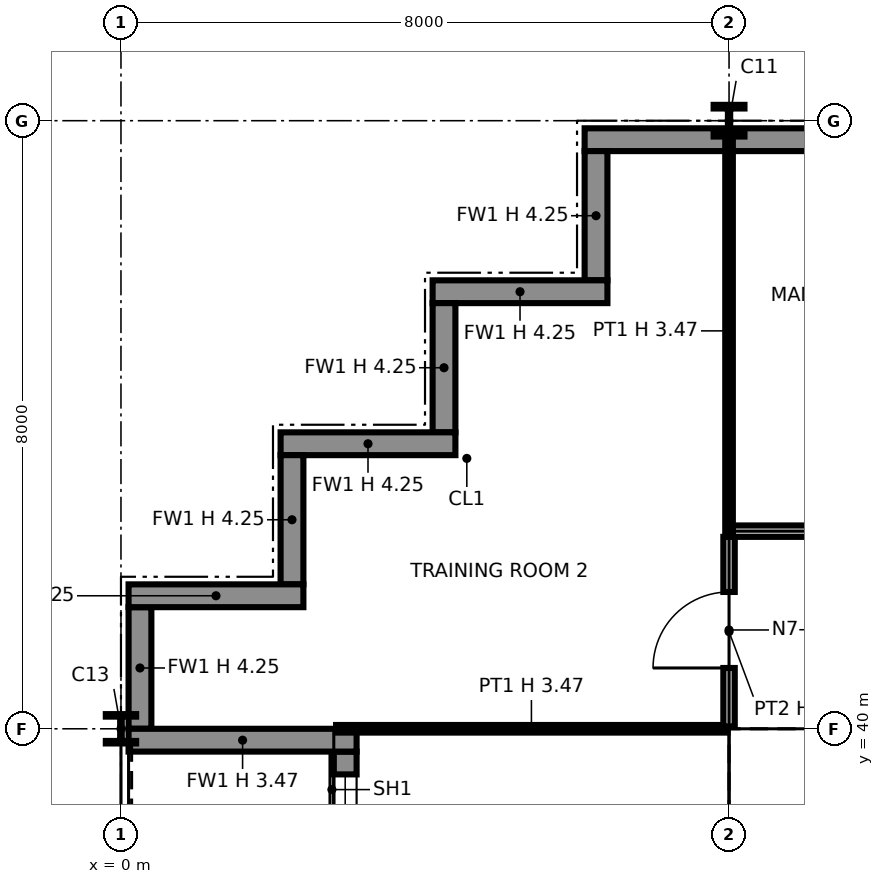
"""IFC4 building model, lengths in metres.
Left out: names, types, materials, properties, quantities, classifications, styles, units other than length and angle.
Written with IfcOpenShell. Run it as: python <this file> out.ifc"""

import sys

from ifc_helpers import new_model, si_unit, direction, frame, frame_2d, origin, origin_2d, place, context, subcontext, project, spatial, polyline, rectangle, i_section, outline, extrude, element, fill, save


model = new_model("IFC4")
c1 = context("Model", 3, precision=1e-05, world=origin(), true_north=direction((0.0, 1.0)))
c2 = subcontext(c1, "Body", "Model", "MODEL_VIEW")
j1 = project(units=[si_unit("LENGTHUNIT", "METRE"), si_unit("PLANEANGLEUNIT", "RADIAN")], contexts=[c1])
p1 = place(None, origin())
s1 = spatial("IfcSite", under=j1, at=p1, CompositionType="ELEMENT")
p2 = place(p1, origin())
s2 = spatial("IfcBuilding", under=s1, at=p2, CompositionType="ELEMENT")
p3 = place(p2, frame((0.0, 0.0, 105.2)))
s3 = spatial("IfcBuildingStorey", under=s2, at=p3, CompositionType="ELEMENT", Elevation=105.2)
p4 = place(p3, frame((0.0, 40.0, 0.0), z_axis=(0.0, 0.0, 1.0), x_axis=(1.0, 0.0, 0.0)))
e1 = element("IfcColumn", 1, at=p4, inside=s3, PredefinedType="COLUMN", context=c2, shape_type="SweptSolid", body=[
    extrude(i_section(OverallWidth=0.399, OverallDepth=0.386, WebThickness=0.021, FlangeThickness=0.033, at=origin_2d()), origin(), (0.0, 0.0, 1.0), 4.25),
])
p5 = place(p3, frame((8.0, 40.0, 0.0), z_axis=(0.0, 0.0, 1.0), x_axis=(1.0, 0.0, 0.0)))
e2 = element("IfcColumn", 2, at=p5, inside=s3, PredefinedType="COLUMN", context=c2, shape_type="SweptSolid", body=[
    extrude(i_section(OverallWidth=0.373, OverallDepth=0.368, WebThickness=0.015, FlangeThickness=0.024, at=origin_2d()), origin(), (0.0, 0.0, 1.0), 4.25),
])
p6 = place(p3, frame((8.0, 48.0, 0.0), z_axis=(0.0, 0.0, 1.0), x_axis=(1.0, 0.0, 0.0)))
e3 = element("IfcColumn", 3, at=p6, inside=s3, PredefinedType="COLUMN", context=c2, shape_type="SweptSolid", body=[
    extrude(i_section(OverallWidth=0.406, OverallDepth=0.417, WebThickness=0.03, FlangeThickness=0.048, at=origin_2d()), origin(), (0.0, 0.0, 1.0), 4.25),
])
p7 = place(p3, frame((0.25, 41.6, 0.0), z_axis=(0.0, 0.0, 1.0), x_axis=(0.0, -1.0, 0.0)))
e4 = element("IfcWall", 4, at=p7, inside=s3, PredefinedType="SOLIDWALL", context=c2, shape_type="SweptSolid", body=[
    extrude(rectangle(XDim=1.6, YDim=0.3, at=frame_2d((0.8, 0.0))), origin(), (0.0, 0.0, 1.0), 4.25),
])
p8 = place(p3, frame((2.95, 39.7, 0.0), z_axis=(0.0, 0.0, 1.0), x_axis=(0.0, -1.0, 0.0)))
e5 = element("IfcWall", 5, at=p8, inside=s3, PredefinedType="SOLIDWALL", context=c2, shape_type="SweptSolid", body=[
    extrude(rectangle(XDim=7.4, YDim=0.3, at=frame_2d((3.7, 0.0))), origin(), (0.0, 0.0, 1.0), 4.25),
])
p9 = place(p8, frame((0.3, 0.0, 0.9)))
e6 = element("IfcOpeningElement", 6, at=p9, cuts=e5, PredefinedType="OPENING", context=c2, shape_type="SweptSolid", body=[
    extrude(rectangle(XDim=2.8, YDim=2.2, at=frame_2d((1.4, 1.1))), frame((0.0, 0.16, 0.0), z_axis=(0.0, -1.0, 0.0), x_axis=(1.0, 0.0, 0.0)), (0.0, 0.0, 1.0), 0.32),
])
p10 = place(p8, frame((4.7, 0.0, 0.0)))
e7 = element("IfcOpeningElement", 7, at=p10, cuts=e5, PredefinedType="OPENING", context=c2, shape_type="SweptSolid", body=[
    extrude(rectangle(XDim=2.0, YDim=2.4, at=frame_2d((1.0, 1.2))), frame((0.0, 0.16, 0.0), z_axis=(0.0, -1.0, 0.0), x_axis=(1.0, 0.0, 0.0)), (0.0, 0.0, 1.0), 0.32),
])
p11 = place(p3, frame((0.1, 39.85, 0.0), z_axis=(0.0, 0.0, 1.0), x_axis=(1.0, 0.0, 0.0)))
e8 = element("IfcWall", 8, at=p11, inside=s3, PredefinedType="SOLIDWALL", context=c2, shape_type="SweptSolid", body=[
    extrude(rectangle(XDim=3.0, YDim=0.3, at=frame_2d((1.5, 0.0))), origin(), (0.0, 0.0, 1.0), 3.469),
])
p12 = place(p3, frame((16.0, 47.75, 0.0), z_axis=(0.0, 0.0, 1.0), x_axis=(-1.0, 0.0, 0.0)))
e9 = element("IfcWall", 9, at=p12, inside=s3, PredefinedType="SOLIDWALL", context=c2, shape_type="SweptSolid", body=[
    extrude(rectangle(XDim=9.9, YDim=0.3, at=frame_2d((4.95, 0.0))), origin(), (0.0, 0.0, 1.0), 4.25),
])
p13 = place(p3, frame((6.25, 47.6, 0.0), z_axis=(0.0, 0.0, 1.0), x_axis=(0.0, -1.0, 0.0)))
e10 = element("IfcWall", 10, at=p13, inside=s3, PredefinedType="SOLIDWALL", context=c2, shape_type="SweptSolid", body=[
    extrude(rectangle(XDim=1.7, YDim=0.3, at=frame_2d((0.85, 0.0))), origin(), (0.0, 0.0, 1.0), 4.25),
])
p14 = place(p3, frame((6.4, 45.75, 0.0), z_axis=(0.0, 0.0, 1.0), x_axis=(-1.0, 0.0, 0.0)))
e11 = element("IfcWall", 11, at=p14, inside=s3, PredefinedType="SOLIDWALL", context=c2, shape_type="SweptSolid", body=[
    extrude(rectangle(XDim=2.3, YDim=0.3, at=frame_2d((1.15, 0.0))), origin(), (0.0, 0.0, 1.0), 4.25),
])
p15 = place(p3, frame((4.25, 45.6, 0.0), z_axis=(0.0, 0.0, 1.0), x_axis=(0.0, -1.0, 0.0)))
e12 = element("IfcWall", 12, at=p15, inside=s3, PredefinedType="SOLIDWALL", context=c2, shape_type="SweptSolid", body=[
    extrude(rectangle(XDim=1.7, YDim=0.3, at=frame_2d((0.85, 0.0))), origin(), (0.0, 0.0, 1.0), 4.25),
])
p16 = place(p3, frame((4.4, 43.75, 0.0), z_axis=(0.0, 0.0, 1.0), x_axis=(-1.0, 0.0, 0.0)))
e13 = element("IfcWall", 13, at=p16, inside=s3, PredefinedType="SOLIDWALL", context=c2, shape_type="SweptSolid", body=[
    extrude(rectangle(XDim=2.3, YDim=0.3, at=frame_2d((1.15, 0.0))), origin(), (0.0, 0.0, 1.0), 4.25),
])
p17 = place(p3, frame((2.25, 43.6, 0.0), z_axis=(0.0, 0.0, 1.0), x_axis=(0.0, -1.0, 0.0)))
e14 = element("IfcWall", 14, at=p17, inside=s3, PredefinedType="SOLIDWALL", context=c2, shape_type="SweptSolid", body=[
    extrude(rectangle(XDim=1.7, YDim=0.3, at=frame_2d((0.85, 0.0))), origin(), (0.0, 0.0, 1.0), 4.25),
])
p18 = place(p3, frame((2.4, 41.75, 0.0), z_axis=(0.0, 0.0, 1.0), x_axis=(-1.0, 0.0, 0.0)))
e15 = element("IfcWall", 15, at=p18, inside=s3, PredefinedType="SOLIDWALL", context=c2, shape_type="SweptSolid", body=[
    extrude(rectangle(XDim=2.3, YDim=0.3, at=frame_2d((1.15, 0.0))), origin(), (0.0, 0.0, 1.0), 4.25),
])
p19 = place(p3, frame((8.75, 32.85, 0.0), z_axis=(0.0, 0.0, 1.0), x_axis=(0.0, 1.0, 0.0)))
e16 = element("IfcWall", 16, at=p19, inside=s3, PredefinedType="PARTITIONING", context=c2, shape_type="SweptSolid", body=[
    extrude(outline(polyline([(0.0, 0.0), (6.3, 0.0), (6.3, 4.25), (3.231, 4.25), (3.23, 3.789), (3.07, 3.789), (3.069, 4.25), (0.0, 4.25), (0.0, 0.0)])), frame((0.0, 0.1, 0.0), z_axis=(0.0, -1.0, 0.0), x_axis=(1.0, 0.0, 0.0)), (0.0, 0.0, 1.0), 0.2),
])
p20 = place(p3, frame((8.65, 39.25, 0.0), z_axis=(0.0, 0.0, 1.0), x_axis=(1.0, 0.0, 0.0)))
e17 = element("IfcWall", 17, at=p20, inside=s3, PredefinedType="PARTITIONING", context=c2, shape_type="SweptSolid", body=[
    extrude(outline(polyline([(0.0, 0.0), (14.7, 0.0), (14.7, 4.25), (7.469, 4.25), (7.469, 3.632), (7.231, 3.632), (7.23, 4.25), (0.0, 4.25), (0.0, 0.0)])), frame((0.0, 0.1, 0.0), z_axis=(0.0, -1.0, 0.0), x_axis=(1.0, 0.0, 0.0)), (0.0, 0.0, 1.0), 0.2),
])
p21 = place(p3, frame((2.83, 40.0, 0.0), z_axis=(0.0, 0.0, 1.0), x_axis=(1.0, 0.0, 0.0)))
e18 = element("IfcWall", 18, at=p21, inside=s3, PredefinedType="PARTITIONING", context=c2, shape_type="SweptSolid", body=[
    extrude(rectangle(XDim=5.14, YDim=0.1, at=frame_2d((2.57, 0.0))), origin(), (0.0, 0.0, 1.0), 3.47),
])
p22 = place(p3, frame((8.0, 40.03, 0.0), z_axis=(0.0, 0.0, 1.0), x_axis=(0.0, 1.0, 0.0)))
e19 = element("IfcWall", 19, at=p22, inside=s3, PredefinedType="PARTITIONING", context=c2, shape_type="SweptSolid", body=[
    extrude(rectangle(XDim=2.495, YDim=0.15, at=frame_2d((1.248, 0.0))), origin(), (0.0, 0.0, 1.0), 3.47),
])
p23 = place(p22, frame((0.77, 0.0, 0.0)))
e20 = element("IfcOpeningElement", 20, at=p23, cuts=e19, PredefinedType="OPENING", context=c2, shape_type="SweptSolid", body=[
    extrude(rectangle(XDim=1.0, YDim=2.1, at=frame_2d((0.5, 1.05))), frame((0.0, 0.085, 0.0), z_axis=(0.0, -1.0, 0.0), x_axis=(1.0, 0.0, 0.0)), (0.0, 0.0, 1.0), 0.17),
])
p24 = place(p3, frame((8.05, 42.6, 0.0), z_axis=(0.0, 0.0, 1.0), x_axis=(1.0, 0.0, 0.0)))
e21 = element("IfcWall", 21, at=p24, inside=s3, PredefinedType="PARTITIONING", context=c2, shape_type="SweptSolid", body=[
    extrude(rectangle(XDim=34.55, YDim=0.15, at=frame_2d((17.275, 0.0))), origin(), (0.0, 0.0, 1.0), 4.25),
])
p25 = place(p24, frame((9.45, 0.0, 0.0)))
e22 = element("IfcOpeningElement", 22, at=p25, cuts=e21, PredefinedType="OPENING", context=c2, shape_type="SweptSolid", body=[
    extrude(rectangle(XDim=1.0, YDim=2.1, at=frame_2d((0.5, 1.05))), frame((0.0, 0.085, 0.0), z_axis=(0.0, -1.0, 0.0), x_axis=(1.0, 0.0, 0.0)), (0.0, 0.0, 1.0), 0.17),
])
p26 = place(p24, frame((13.45, 0.0, 0.0)))
e23 = element("IfcOpeningElement", 23, at=p26, cuts=e21, PredefinedType="OPENING", context=c2, shape_type="SweptSolid", body=[
    extrude(rectangle(XDim=1.0, YDim=2.1, at=frame_2d((0.5, 1.05))), frame((0.0, 0.085, 0.0), z_axis=(0.0, -1.0, 0.0), x_axis=(1.0, 0.0, 0.0)), (0.0, 0.0, 1.0), 0.17),
])
p27 = place(p24, frame((25.45, 0.0, 0.0)))
e24 = element("IfcOpeningElement", 24, at=p27, cuts=e21, PredefinedType="OPENING", context=c2, shape_type="SweptSolid", body=[
    extrude(rectangle(XDim=1.0, YDim=2.1, at=frame_2d((0.5, 1.05))), frame((0.0, 0.085, 0.0), z_axis=(0.0, -1.0, 0.0), x_axis=(1.0, 0.0, 0.0)), (0.0, 0.0, 1.0), 0.17),
])
p28 = place(p24, frame((29.45, 0.0, 0.0)))
e25 = element("IfcOpeningElement", 25, at=p28, cuts=e21, PredefinedType="OPENING", context=c2, shape_type="SweptSolid", body=[
    extrude(rectangle(XDim=1.0, YDim=2.1, at=frame_2d((0.5, 1.05))), frame((0.0, 0.085, 0.0), z_axis=(0.0, -1.0, 0.0), x_axis=(1.0, 0.0, 0.0)), (0.0, 0.0, 1.0), 0.17),
])
p29 = place(p24, frame((1.45, 0.0, 0.0)))
e26 = element("IfcOpeningElement", 26, at=p29, cuts=e21, PredefinedType="OPENING", context=c2, shape_type="SweptSolid", body=[
    extrude(rectangle(XDim=1.0, YDim=2.1, at=frame_2d((0.5, 1.05))), frame((0.0, 0.085, 0.0), z_axis=(0.0, -1.0, 0.0), x_axis=(1.0, 0.0, 0.0)), (0.0, 0.0, 1.0), 0.17),
])
p30 = place(p24, frame((5.45, 0.0, 0.0)))
e27 = element("IfcOpeningElement", 27, at=p30, cuts=e21, PredefinedType="OPENING", context=c2, shape_type="SweptSolid", body=[
    extrude(rectangle(XDim=1.0, YDim=2.1, at=frame_2d((0.5, 1.05))), frame((0.0, 0.085, 0.0), z_axis=(0.0, -1.0, 0.0), x_axis=(1.0, 0.0, 0.0)), (0.0, 0.0, 1.0), 0.17),
])
p31 = place(p24, frame((17.45, 0.0, 0.0)))
e28 = element("IfcOpeningElement", 28, at=p31, cuts=e21, PredefinedType="OPENING", context=c2, shape_type="SweptSolid", body=[
    extrude(rectangle(XDim=1.0, YDim=2.1, at=frame_2d((0.5, 1.05))), frame((0.0, 0.085, 0.0), z_axis=(0.0, -1.0, 0.0), x_axis=(1.0, 0.0, 0.0)), (0.0, 0.0, 1.0), 0.17),
])
p32 = place(p24, frame((21.45, 0.0, 0.0)))
e29 = element("IfcOpeningElement", 29, at=p32, cuts=e21, PredefinedType="OPENING", context=c2, shape_type="SweptSolid", body=[
    extrude(rectangle(XDim=1.0, YDim=2.1, at=frame_2d((0.5, 1.05))), frame((0.0, 0.085, 0.0), z_axis=(0.0, -1.0, 0.0), x_axis=(1.0, 0.0, 0.0)), (0.0, 0.0, 1.0), 0.17),
])
p33 = place(p3, frame((8.0, 42.6, 0.0), z_axis=(0.0, 0.0, 1.0), x_axis=(0.0, 1.0, 0.0)))
e30 = element("IfcWall", 30, at=p33, inside=s3, PredefinedType="PARTITIONING", context=c2, shape_type="SweptSolid", body=[
    extrude(rectangle(XDim=5.27, YDim=0.1, at=frame_2d((2.635, 0.0))), origin(), (0.0, 0.0, 1.0), 3.47),
])
p34 = place(p9, origin())
e31 = element("IfcWindow", 31, at=p34, inside=s3, PartitioningType="SINGLE_PANEL", PredefinedType="WINDOW", context=c2, shape_type="SweptSolid", body=[
    extrude(rectangle(XDim=2.8, YDim=2.2, at=frame_2d((1.4, 1.1))), frame((0.0, 0.03, 0.0), z_axis=(0.0, -1.0, 0.0), x_axis=(1.0, 0.0, 0.0)), (0.0, 0.0, 1.0), 0.06),
])
fill(e6, e31)
p35 = place(p23, origin())
e32 = element("IfcDoor", 32, at=p35, inside=s3, OperationType="SINGLE_SWING_LEFT", PredefinedType="DOOR", context=c2, shape_type="SweptSolid", body=[
    extrude(rectangle(XDim=1.0, YDim=2.1, at=frame_2d((0.5, 1.05))), frame((0.0, 0.025, 0.0), z_axis=(0.0, -1.0, 0.0), x_axis=(1.0, 0.0, 0.0)), (0.0, 0.0, 1.0), 0.05),
])
fill(e20, e32)
save(model, sys.argv[1])
